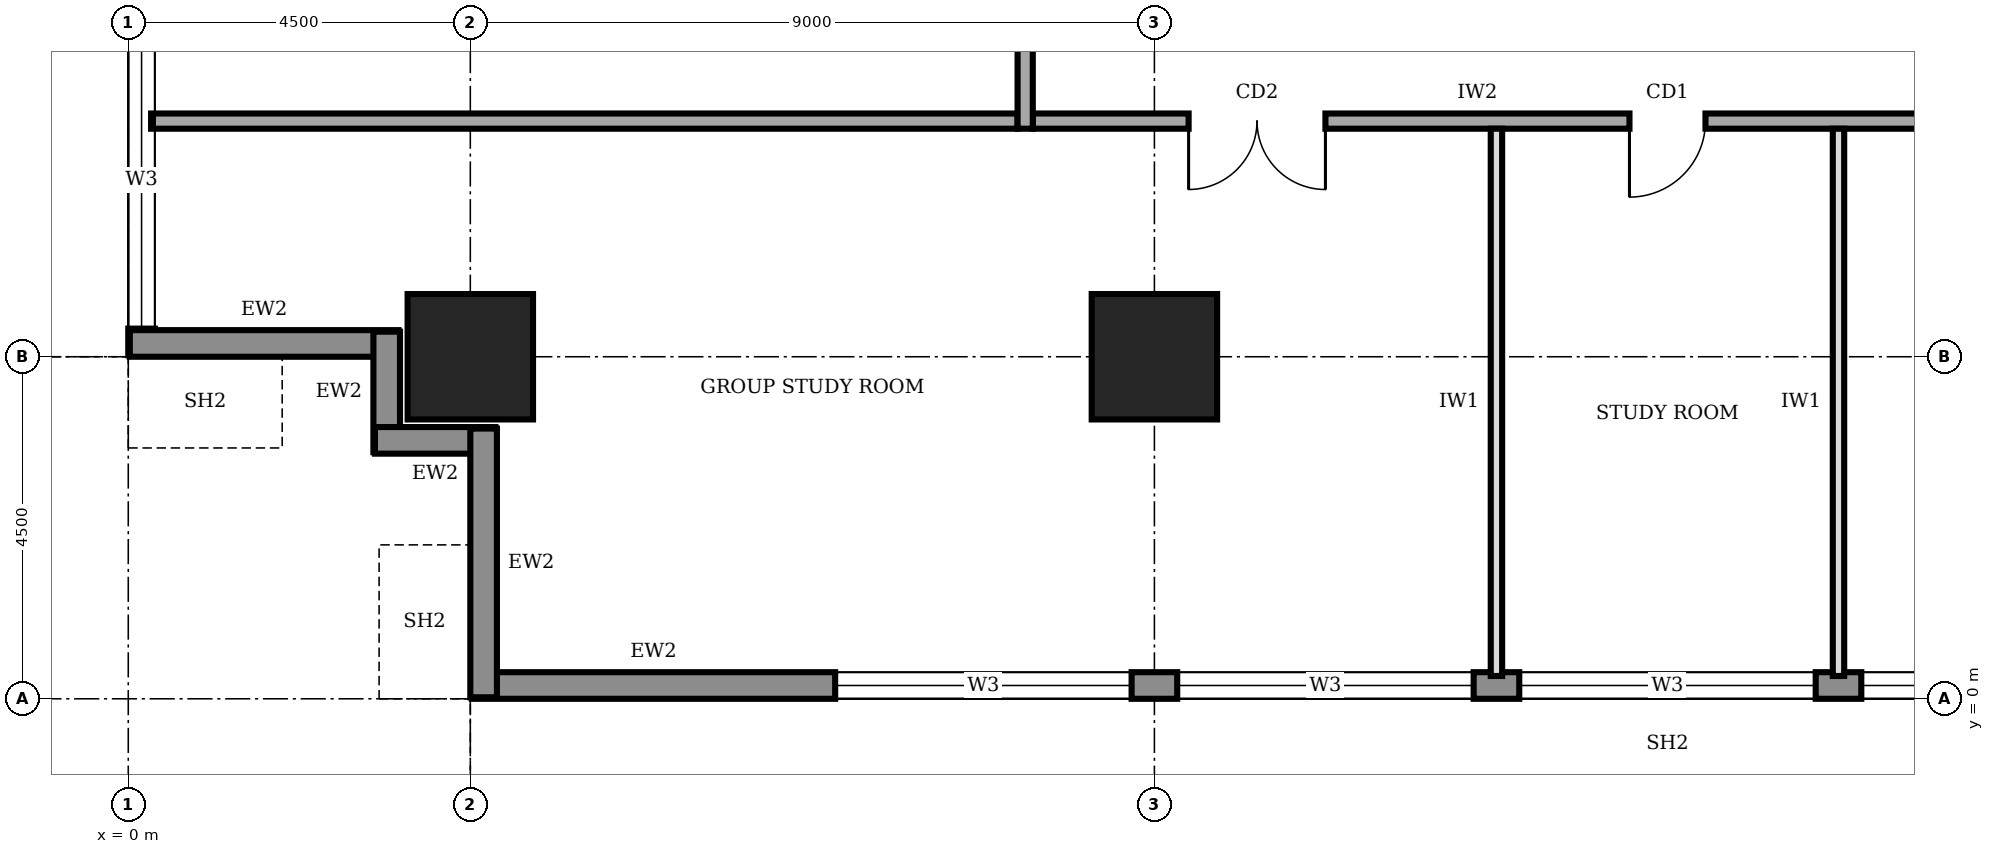
"""IFC4 building model, lengths in metres.
Left out: names, types, materials, properties, quantities, classifications, styles, units other than length and angle.
Written with IfcOpenShell. Run it as: python <this file> out.ifc"""

import sys

from ifc_helpers import new_model, si_unit, direction, frame, frame_2d, origin, origin_2d, place, context, subcontext, project, spatial, rectangle, extrude, element, fill, save


model = new_model("IFC4")
c1 = context("Model", 3, precision=1e-05, world=origin(), true_north=direction((0.0, 1.0)))
c2 = subcontext(c1, "Body", "Model", "MODEL_VIEW")
j1 = project(units=[si_unit("LENGTHUNIT", "METRE"), si_unit("PLANEANGLEUNIT", "RADIAN")], contexts=[c1])
p1 = place(None, origin())
s1 = spatial("IfcSite", under=j1, at=p1, CompositionType="ELEMENT")
p2 = place(p1, origin())
s2 = spatial("IfcBuilding", under=s1, at=p2, CompositionType="ELEMENT")
p3 = place(p2, frame((0.0, 0.0, 193.0)))
s3 = spatial("IfcBuildingStorey", under=s2, at=p3, CompositionType="ELEMENT", Elevation=193.0)
for number, where, z_axis, x_axis in (
    (1, (4.5, 4.5, 0.0), (0.0, 0.0, 1.0), (1.0, 0.0, 0.0)),
    (2, (13.5, 4.5, 0.0), (0.0, 0.0, 1.0), (1.0, 0.0, 0.0)),
):
    element("IfcColumn", number, at=place(p3, frame(where, z_axis=z_axis, x_axis=x_axis)), inside=s3, PredefinedType="COLUMN", context=c2, shape_type="SweptSolid", body=[
        extrude(rectangle(XDim=1.65, YDim=1.65, at=origin_2d()), origin(), (0.0, 0.0, 1.0), 4.0),
    ])
p4 = place(p3, frame((4.52, 0.175, 0.0), z_axis=(0.0, 0.0, 1.0), x_axis=(1.0, 0.0, 0.0)))
e3 = element("IfcWall", 3, at=p4, inside=s3, PredefinedType="STANDARD", context=c2, shape_type="SweptSolid", body=[
    extrude(rectangle(XDim=31.46, YDim=0.35, at=frame_2d((15.73, 0.0))), origin(), (0.0, 0.0, 1.0), 3.75),
])
p5 = place(p4, frame((4.78, 0.0, 0.95)))
e4 = element("IfcOpeningElement", 4, at=p5, cuts=e3, PredefinedType="OPENING", context=c2, shape_type="SweptSolid", body=[
    extrude(rectangle(XDim=3.9, YDim=1.8, at=frame_2d((1.95, 0.9))), frame((0.0, 0.185, 0.0), z_axis=(0.0, -1.0, 0.0), x_axis=(1.0, 0.0, 0.0)), (0.0, 0.0, 1.0), 0.37),
])
p6 = place(p4, frame((9.28, 0.0, 0.95)))
e5 = element("IfcOpeningElement", 5, at=p6, cuts=e3, PredefinedType="OPENING", context=c2, shape_type="SweptSolid", body=[
    extrude(rectangle(XDim=3.9, YDim=1.8, at=frame_2d((1.95, 0.9))), frame((0.0, 0.185, 0.0), z_axis=(0.0, -1.0, 0.0), x_axis=(1.0, 0.0, 0.0)), (0.0, 0.0, 1.0), 0.37),
])
p7 = place(p4, frame((13.78, 0.0, 0.95)))
e6 = element("IfcOpeningElement", 6, at=p7, cuts=e3, PredefinedType="OPENING", context=c2, shape_type="SweptSolid", body=[
    extrude(rectangle(XDim=3.9, YDim=1.8, at=frame_2d((1.95, 0.9))), frame((0.0, 0.185, 0.0), z_axis=(0.0, -1.0, 0.0), x_axis=(1.0, 0.0, 0.0)), (0.0, 0.0, 1.0), 0.37),
])
p8 = place(p4, frame((18.28, 0.0, 0.95)))
e7 = element("IfcOpeningElement", 7, at=p8, cuts=e3, PredefinedType="OPENING", context=c2, shape_type="SweptSolid", body=[
    extrude(rectangle(XDim=3.9, YDim=1.8, at=frame_2d((1.95, 0.9))), frame((0.0, 0.185, 0.0), z_axis=(0.0, -1.0, 0.0), x_axis=(1.0, 0.0, 0.0)), (0.0, 0.0, 1.0), 0.37),
])
p9 = place(p4, frame((22.78, 0.0, 0.95)))
e8 = element("IfcOpeningElement", 8, at=p9, cuts=e3, PredefinedType="OPENING", context=c2, shape_type="SweptSolid", body=[
    extrude(rectangle(XDim=3.9, YDim=1.8, at=frame_2d((1.95, 0.9))), frame((0.0, 0.185, 0.0), z_axis=(0.0, -1.0, 0.0), x_axis=(1.0, 0.0, 0.0)), (0.0, 0.0, 1.0), 0.37),
])
p10 = place(p4, frame((27.21, 0.0, 0.95)))
e9 = element("IfcOpeningElement", 9, at=p10, cuts=e3, PredefinedType="OPENING", context=c2, shape_type="SweptSolid", body=[
    extrude(rectangle(XDim=3.9, YDim=1.8, at=frame_2d((1.95, 0.9))), frame((0.0, 0.185, 0.0), z_axis=(0.0, -1.0, 0.0), x_axis=(1.0, 0.0, 0.0)), (0.0, 0.0, 1.0), 0.37),
])
p11 = place(p3, frame((0.175, 35.98, 0.0), z_axis=(0.0, 0.0, 1.0), x_axis=(0.0, -1.0, 0.0)))
e10 = element("IfcWall", 10, at=p11, inside=s3, PredefinedType="STANDARD", context=c2, shape_type="SweptSolid", body=[
    extrude(rectangle(XDim=31.46, YDim=0.35, at=frame_2d((15.73, 0.0))), origin(), (0.0, 0.0, 1.0), 3.75),
])
p12 = place(p11, frame((27.21, 0.0, 0.95)))
e11 = element("IfcOpeningElement", 11, at=p12, cuts=e10, PredefinedType="OPENING", context=c2, shape_type="SweptSolid", body=[
    extrude(rectangle(XDim=3.9, YDim=1.8, at=frame_2d((1.95, 0.9))), frame((0.0, 0.185, 0.0), z_axis=(0.0, -1.0, 0.0), x_axis=(1.0, 0.0, 0.0)), (0.0, 0.0, 1.0), 0.37),
])
p13 = place(p11, frame((22.78, 0.0, 0.95)))
e12 = element("IfcOpeningElement", 12, at=p13, cuts=e10, PredefinedType="OPENING", context=c2, shape_type="SweptSolid", body=[
    extrude(rectangle(XDim=3.9, YDim=1.8, at=frame_2d((1.95, 0.9))), frame((0.0, 0.185, 0.0), z_axis=(0.0, -1.0, 0.0), x_axis=(1.0, 0.0, 0.0)), (0.0, 0.0, 1.0), 0.37),
])
p14 = place(p11, frame((18.28, 0.0, 0.95)))
e13 = element("IfcOpeningElement", 13, at=p14, cuts=e10, PredefinedType="OPENING", context=c2, shape_type="SweptSolid", body=[
    extrude(rectangle(XDim=3.9, YDim=1.8, at=frame_2d((1.95, 0.9))), frame((0.0, 0.185, 0.0), z_axis=(0.0, -1.0, 0.0), x_axis=(1.0, 0.0, 0.0)), (0.0, 0.0, 1.0), 0.37),
])
p15 = place(p11, frame((13.78, 0.0, 0.95)))
e14 = element("IfcOpeningElement", 14, at=p15, cuts=e10, PredefinedType="OPENING", context=c2, shape_type="SweptSolid", body=[
    extrude(rectangle(XDim=3.9, YDim=1.8, at=frame_2d((1.95, 0.9))), frame((0.0, 0.185, 0.0), z_axis=(0.0, -1.0, 0.0), x_axis=(1.0, 0.0, 0.0)), (0.0, 0.0, 1.0), 0.37),
])
p16 = place(p11, frame((9.28, 0.0, 0.95)))
e15 = element("IfcOpeningElement", 15, at=p16, cuts=e10, PredefinedType="OPENING", context=c2, shape_type="SweptSolid", body=[
    extrude(rectangle(XDim=3.9, YDim=1.8, at=frame_2d((1.95, 0.9))), frame((0.0, 0.185, 0.0), z_axis=(0.0, -1.0, 0.0), x_axis=(1.0, 0.0, 0.0)), (0.0, 0.0, 1.0), 0.37),
])
p17 = place(p11, frame((4.78, 0.0, 0.95)))
e16 = element("IfcOpeningElement", 16, at=p17, cuts=e10, PredefinedType="OPENING", context=c2, shape_type="SweptSolid", body=[
    extrude(rectangle(XDim=3.9, YDim=1.8, at=frame_2d((1.95, 0.9))), frame((0.0, 0.185, 0.0), z_axis=(0.0, -1.0, 0.0), x_axis=(1.0, 0.0, 0.0)), (0.0, 0.0, 1.0), 0.37),
])
p18 = place(p3, frame((0.02, 4.675, 0.0), z_axis=(0.0, 0.0, 1.0), x_axis=(1.0, 0.0, 0.0)))
e17 = element("IfcWall", 17, at=p18, inside=s3, PredefinedType="STANDARD", context=c2, shape_type="SweptSolid", body=[
    extrude(rectangle(XDim=3.535, YDim=0.35, at=frame_2d((1.768, 0.0))), origin(), (0.0, 0.0, 1.0), 2.85),
])
for number, where, z_axis, x_axis in (
    (18, (3.4, 4.83, 0.0), (0.0, 0.0, 1.0), (0.0, -1.0, 0.0)),
    (19, (3.245, 3.4, 0.0), (0.0, 0.0, 1.0), (1.0, 0.0, 0.0)),
):
    element("IfcWall", number, at=place(p3, frame(where, z_axis=z_axis, x_axis=x_axis)), inside=s3, PredefinedType="STANDARD", context=c2, shape_type="SweptSolid", body=[
        extrude(rectangle(XDim=1.585, YDim=0.35, at=frame_2d((0.792, 0.0))), origin(), (0.0, 0.0, 1.0), 3.75),
    ])
p19 = place(p3, frame((4.675, 3.555, 0.0), z_axis=(0.0, 0.0, 1.0), x_axis=(0.0, -1.0, 0.0)))
e20 = element("IfcWall", 20, at=p19, inside=s3, PredefinedType="STANDARD", context=c2, shape_type="SweptSolid", body=[
    extrude(rectangle(XDim=3.535, YDim=0.35, at=frame_2d((1.768, 0.0))), origin(), (0.0, 0.0, 1.0), 2.85),
])
p20 = place(p3, frame((11.9, 7.6, 0.0), z_axis=(0.0, 0.0, 1.0), x_axis=(1.0, 0.0, 0.0)))
e21 = element("IfcWall", 21, at=p20, inside=s3, PredefinedType="SOLIDWALL", context=c2, shape_type="SweptSolid", body=[
    extrude(rectangle(XDim=16.9, YDim=0.2, at=frame_2d((8.45, 0.0))), origin(), (0.0, 0.0, 1.0), 3.75),
])
p21 = place(p20, frame((2.05, 0.0, 0.0)))
e22 = element("IfcOpeningElement", 22, at=p21, cuts=e21, PredefinedType="OPENING", context=c2, shape_type="SweptSolid", body=[
    extrude(rectangle(XDim=1.8, YDim=2.1, at=frame_2d((0.9, 1.05))), frame((0.0, 0.11, 0.0), z_axis=(0.0, -1.0, 0.0), x_axis=(1.0, 0.0, 0.0)), (0.0, 0.0, 1.0), 0.22),
])
p22 = place(p20, frame((7.85, 0.0, 0.0)))
e23 = element("IfcOpeningElement", 23, at=p22, cuts=e21, PredefinedType="OPENING", context=c2, shape_type="SweptSolid", body=[
    extrude(rectangle(XDim=1.0, YDim=2.1, at=frame_2d((0.5, 1.05))), frame((0.0, 0.11, 0.0), z_axis=(0.0, -1.0, 0.0), x_axis=(1.0, 0.0, 0.0)), (0.0, 0.0, 1.0), 0.22),
])
p23 = place(p20, frame((12.85, 0.0, 0.0)))
e24 = element("IfcOpeningElement", 24, at=p23, cuts=e21, PredefinedType="OPENING", context=c2, shape_type="SweptSolid", body=[
    extrude(rectangle(XDim=1.8, YDim=2.1, at=frame_2d((0.9, 1.05))), frame((0.0, 0.11, 0.0), z_axis=(0.0, -1.0, 0.0), x_axis=(1.0, 0.0, 0.0)), (0.0, 0.0, 1.0), 0.22),
])
p24 = place(p3, frame((11.8, 32.8, 0.0), z_axis=(0.0, 0.0, 1.0), x_axis=(0.0, -1.0, 0.0)))
e25 = element("IfcWall", 25, at=p24, inside=s3, PredefinedType="SOLIDWALL", context=c2, shape_type="SweptSolid", body=[
    extrude(rectangle(XDim=25.3, YDim=0.2, at=frame_2d((12.65, 0.0))), origin(), (0.0, 0.0, 1.0), 3.75),
])
p25 = place(p24, frame((21.8, 0.0, 0.0)))
e26 = element("IfcOpeningElement", 26, at=p25, cuts=e25, PredefinedType="OPENING", context=c2, shape_type="SweptSolid", body=[
    extrude(rectangle(XDim=1.0, YDim=2.1, at=frame_2d((0.5, 1.05))), frame((0.0, 0.11, 0.0), z_axis=(0.0, -1.0, 0.0), x_axis=(1.0, 0.0, 0.0)), (0.0, 0.0, 1.0), 0.22),
])
p26 = place(p24, frame((17.7, 0.0, 0.0)))
e27 = element("IfcOpeningElement", 27, at=p26, cuts=e25, PredefinedType="OPENING", context=c2, shape_type="SweptSolid", body=[
    extrude(rectangle(XDim=1.0, YDim=2.1, at=frame_2d((0.5, 1.05))), frame((0.0, 0.11, 0.0), z_axis=(0.0, -1.0, 0.0), x_axis=(1.0, 0.0, 0.0)), (0.0, 0.0, 1.0), 0.22),
])
p27 = place(p24, frame((14.7, 0.0, 0.0)))
e28 = element("IfcOpeningElement", 28, at=p27, cuts=e25, PredefinedType="OPENING", context=c2, shape_type="SweptSolid", body=[
    extrude(rectangle(XDim=0.9, YDim=2.1, at=frame_2d((0.45, 1.05))), frame((0.0, 0.11, 0.0), z_axis=(0.0, -1.0, 0.0), x_axis=(1.0, 0.0, 0.0)), (0.0, 0.0, 1.0), 0.22),
])
p28 = place(p24, frame((11.65, 0.0, 0.0)))
e29 = element("IfcOpeningElement", 29, at=p28, cuts=e25, PredefinedType="OPENING", context=c2, shape_type="SweptSolid", body=[
    extrude(rectangle(XDim=0.9, YDim=2.1, at=frame_2d((0.45, 1.05))), frame((0.0, 0.11, 0.0), z_axis=(0.0, -1.0, 0.0), x_axis=(1.0, 0.0, 0.0)), (0.0, 0.0, 1.0), 0.22),
])
p29 = place(p24, frame((6.95, 0.0, 0.0)))
e30 = element("IfcOpeningElement", 30, at=p29, cuts=e25, PredefinedType="OPENING", context=c2, shape_type="SweptSolid", body=[
    extrude(rectangle(XDim=0.9, YDim=2.1, at=frame_2d((0.45, 1.05))), frame((0.0, 0.11, 0.0), z_axis=(0.0, -1.0, 0.0), x_axis=(1.0, 0.0, 0.0)), (0.0, 0.0, 1.0), 0.22),
])
p30 = place(p24, frame((9.5, 0.0, 0.0)))
e31 = element("IfcOpeningElement", 31, at=p30, cuts=e25, PredefinedType="OPENING", context=c2, shape_type="SweptSolid", body=[
    extrude(rectangle(XDim=1.0, YDim=2.1, at=frame_2d((0.5, 1.05))), frame((0.0, 0.11, 0.0), z_axis=(0.0, -1.0, 0.0), x_axis=(1.0, 0.0, 0.0)), (0.0, 0.0, 1.0), 0.22),
])
p31 = place(p24, frame((2.3, 0.0, 0.0)))
e32 = element("IfcOpeningElement", 32, at=p31, cuts=e25, PredefinedType="OPENING", context=c2, shape_type="SweptSolid", body=[
    extrude(rectangle(XDim=1.0, YDim=2.1, at=frame_2d((0.5, 1.05))), frame((0.0, 0.11, 0.0), z_axis=(0.0, -1.0, 0.0), x_axis=(1.0, 0.0, 0.0)), (0.0, 0.0, 1.0), 0.22),
])
p32 = place(p3, frame((0.3, 7.6, 0.0), z_axis=(0.0, 0.0, 1.0), x_axis=(1.0, 0.0, 0.0)))
e33 = element("IfcWall", 33, at=p32, inside=s3, PredefinedType="SOLIDWALL", context=c2, shape_type="SweptSolid", body=[
    extrude(rectangle(XDim=11.4, YDim=0.2, at=frame_2d((5.7, 0.0))), origin(), (0.0, 0.0, 1.0), 3.75),
])
for number, where, z_axis, x_axis in (
    (34, (18.0, 0.3, 0.0), (0.0, 0.0, 1.0), (0.0, 1.0, 0.0)),
    (35, (22.5, 0.3, 0.0), (0.0, 0.0, 1.0), (0.0, 1.0, 0.0)),
):
    element("IfcWall", number, at=place(p3, frame(where, z_axis=z_axis, x_axis=x_axis)), inside=s3, PredefinedType="PARTITIONING", context=c2, shape_type="SweptSolid", body=[
        extrude(rectangle(XDim=7.2, YDim=0.15, at=frame_2d((3.6, 0.0))), origin(), (0.0, 0.0, 1.0), 3.75),
    ])
p33 = place(p5, origin())
e36 = element("IfcWindow", 36, at=p33, inside=s3, PartitioningType="SINGLE_PANEL", PredefinedType="WINDOW", context=c2, shape_type="SweptSolid", body=[
    extrude(rectangle(XDim=3.9, YDim=1.8, at=frame_2d((1.95, 0.9))), frame((0.0, 0.03, 0.0), z_axis=(0.0, -1.0, 0.0), x_axis=(1.0, 0.0, 0.0)), (0.0, 0.0, 1.0), 0.06),
])
fill(e4, e36)
p34 = place(p6, origin())
e37 = element("IfcWindow", 37, at=p34, inside=s3, PartitioningType="SINGLE_PANEL", PredefinedType="WINDOW", context=c2, shape_type="SweptSolid", body=[
    extrude(rectangle(XDim=3.9, YDim=1.8, at=frame_2d((1.95, 0.9))), frame((0.0, 0.03, 0.0), z_axis=(0.0, -1.0, 0.0), x_axis=(1.0, 0.0, 0.0)), (0.0, 0.0, 1.0), 0.06),
])
fill(e5, e37)
p35 = place(p7, origin())
e38 = element("IfcWindow", 38, at=p35, inside=s3, PartitioningType="SINGLE_PANEL", PredefinedType="WINDOW", context=c2, shape_type="SweptSolid", body=[
    extrude(rectangle(XDim=3.9, YDim=1.8, at=frame_2d((1.95, 0.9))), frame((0.0, 0.03, 0.0), z_axis=(0.0, -1.0, 0.0), x_axis=(1.0, 0.0, 0.0)), (0.0, 0.0, 1.0), 0.06),
])
fill(e6, e38)
p36 = place(p8, origin())
e39 = element("IfcWindow", 39, at=p36, inside=s3, PartitioningType="SINGLE_PANEL", PredefinedType="WINDOW", context=c2, shape_type="SweptSolid", body=[
    extrude(rectangle(XDim=3.9, YDim=1.8, at=frame_2d((1.95, 0.9))), frame((0.0, 0.03, 0.0), z_axis=(0.0, -1.0, 0.0), x_axis=(1.0, 0.0, 0.0)), (0.0, 0.0, 1.0), 0.06),
])
fill(e7, e39)
p37 = place(p12, origin())
e40 = element("IfcWindow", 40, at=p37, inside=s3, PartitioningType="SINGLE_PANEL", PredefinedType="WINDOW", context=c2, shape_type="SweptSolid", body=[
    extrude(rectangle(XDim=3.9, YDim=1.8, at=frame_2d((1.95, 0.9))), frame((0.0, 0.03, 0.0), z_axis=(0.0, -1.0, 0.0), x_axis=(1.0, 0.0, 0.0)), (0.0, 0.0, 1.0), 0.06),
])
fill(e11, e40)
p38 = place(p21, frame((1.8, 0.0, 0.0), z_axis=(0.0, 0.0, 1.0), x_axis=(-1.0, 0.0, 0.0)))
e41 = element("IfcDoor", 41, at=p38, inside=s3, OperationType="DOUBLE_DOOR_SINGLE_SWING", PredefinedType="DOOR", context=c2, shape_type="SweptSolid", body=[
    extrude(rectangle(XDim=1.8, YDim=2.1, at=frame_2d((0.9, 1.05))), frame((0.0, 0.025, 0.0), z_axis=(0.0, -1.0, 0.0), x_axis=(1.0, 0.0, 0.0)), (0.0, 0.0, 1.0), 0.05),
])
fill(e22, e41)
p39 = place(p22, frame((1.0, 0.0, 0.0), z_axis=(0.0, 0.0, 1.0), x_axis=(-1.0, 0.0, 0.0)))
e42 = element("IfcDoor", 42, at=p39, inside=s3, OperationType="SINGLE_SWING_RIGHT", PredefinedType="DOOR", context=c2, shape_type="SweptSolid", body=[
    extrude(rectangle(XDim=1.0, YDim=2.1, at=frame_2d((0.5, 1.05))), frame((0.0, 0.025, 0.0), z_axis=(0.0, -1.0, 0.0), x_axis=(1.0, 0.0, 0.0)), (0.0, 0.0, 1.0), 0.05),
])
fill(e23, e42)
save(model, sys.argv[1])
